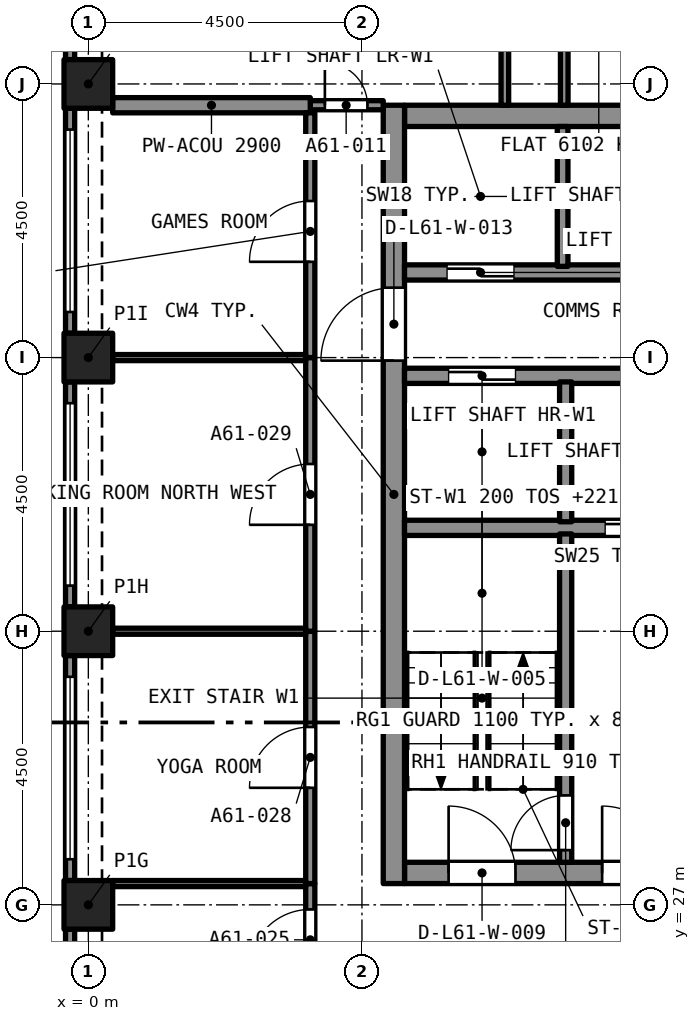
"""IFC4 building model, lengths in metres.
Left out: names, types, materials, properties, quantities, classifications, styles, units other than length and angle.
Written with IfcOpenShell. Run it as: python <this file> out.ifc"""

import sys

from ifc_helpers import new_model, si_unit, direction, frame, frame_2d, origin, origin_2d, place, context, subcontext, project, spatial, rectangle, extrude, element, fill, save


model = new_model("IFC4")
c1 = context("Model", 3, precision=1e-05, world=origin(), true_north=direction((0.0, 1.0)))
c2 = subcontext(c1, "Body", "Model", "MODEL_VIEW")
j1 = project(units=[si_unit("LENGTHUNIT", "METRE"), si_unit("PLANEANGLEUNIT", "RADIAN")], contexts=[c1])
p1 = place(None, origin())
s1 = spatial("IfcSite", under=j1, at=p1, CompositionType="ELEMENT")
p2 = place(p1, origin())
s2 = spatial("IfcBuilding", under=s1, at=p2, CompositionType="ELEMENT")
p3 = place(p2, frame((0.0, 0.0, 219.695)))
s3 = spatial("IfcBuildingStorey", under=s2, at=p3, CompositionType="ELEMENT", Elevation=219.695)
for number, where, z_axis, x_axis in (
    (1, (0.0, 27.0, 0.0), (0.0, 0.0, 1.0), (1.0, 0.0, 0.0)),
    (2, (0.0, 31.5, 0.0), (0.0, 0.0, 1.0), (1.0, 0.0, 0.0)),
    (3, (0.0, 36.0, 0.0), (0.0, 0.0, 1.0), (1.0, 0.0, 0.0)),
    (4, (0.0, 40.5, 0.0), (0.0, 0.0, 1.0), (1.0, 0.0, 0.0)),
):
    element("IfcColumn", number, at=place(p3, frame(where, z_axis=z_axis, x_axis=x_axis)), inside=s3, PredefinedType="COLUMN", context=c2, shape_type="SweptSolid", body=[
        extrude(rectangle(XDim=0.8, YDim=0.8, at=origin_2d()), origin(), (0.0, 0.0, 1.0), 3.2),
    ])
p4 = place(p3, frame((5.2, 27.525, 0.0), z_axis=(0.0, 0.0, 1.0), x_axis=(1.0, 0.0, 0.0)))
e5 = element("IfcWall", 5, at=p4, inside=s3, PredefinedType="SOLIDWALL", context=c2, shape_type="SweptSolid", body=[
    extrude(rectangle(XDim=7.6, YDim=0.35, at=frame_2d((3.8, 0.0))), origin(), (0.0, 0.0, 1.0), 3.2),
])
p5 = place(p4, frame((0.725, 0.0, 0.0)))
e6 = element("IfcOpeningElement", 6, at=p5, cuts=e5, PredefinedType="OPENING", context=c2, shape_type="SweptSolid", body=[
    extrude(rectangle(XDim=1.1, YDim=2.1, at=frame_2d((0.55, 1.05))), frame((0.0, 0.185, 0.0), z_axis=(0.0, -1.0, 0.0), x_axis=(1.0, 0.0, 0.0)), (0.0, 0.0, 1.0), 0.37),
])
p6 = place(p4, frame((3.25, 0.0, 0.0)))
e7 = element("IfcOpeningElement", 7, at=p6, cuts=e5, PredefinedType="OPENING", context=c2, shape_type="SweptSolid", body=[
    extrude(rectangle(XDim=1.1, YDim=2.1, at=frame_2d((0.55, 1.05))), frame((0.0, 0.185, 0.0), z_axis=(0.0, -1.0, 0.0), x_axis=(1.0, 0.0, 0.0)), (0.0, 0.0, 1.0), 0.37),
])
p7 = place(p4, frame((5.775, 0.0, 0.0)))
e8 = element("IfcOpeningElement", 8, at=p7, cuts=e5, PredefinedType="OPENING", context=c2, shape_type="SweptSolid", body=[
    extrude(rectangle(XDim=1.1, YDim=2.1, at=frame_2d((0.55, 1.05))), frame((0.0, 0.185, 0.0), z_axis=(0.0, -1.0, 0.0), x_axis=(1.0, 0.0, 0.0)), (0.0, 0.0, 1.0), 0.37),
])
p8 = place(p3, frame((5.2, 39.975, 0.0), z_axis=(0.0, 0.0, 1.0), x_axis=(1.0, 0.0, 0.0)))
e9 = element("IfcWall", 9, at=p8, inside=s3, PredefinedType="SOLIDWALL", context=c2, shape_type="SweptSolid", body=[
    extrude(rectangle(XDim=7.6, YDim=0.35, at=frame_2d((3.8, 0.0))), origin(), (0.0, 0.0, 1.0), 3.2),
])
p9 = place(p3, frame((5.025, 27.35, 0.0), z_axis=(0.0, 0.0, 1.0), x_axis=(0.0, 1.0, 0.0)))
e10 = element("IfcWall", 10, at=p9, inside=s3, PredefinedType="SOLIDWALL", context=c2, shape_type="SweptSolid", body=[
    extrude(rectangle(XDim=12.8, YDim=0.35, at=frame_2d((6.4, 0.0))), origin(), (0.0, 0.0, 1.0), 3.2),
])
p10 = place(p9, frame((8.6, 0.0, 0.0)))
e11 = element("IfcOpeningElement", 11, at=p10, cuts=e10, PredefinedType="OPENING", context=c2, shape_type="SweptSolid", body=[
    extrude(rectangle(XDim=1.2, YDim=2.1, at=frame_2d((0.6, 1.05))), frame((0.0, 0.185, 0.0), z_axis=(0.0, -1.0, 0.0), x_axis=(1.0, 0.0, 0.0)), (0.0, 0.0, 1.0), 0.37),
])
p11 = place(p3, frame((-0.3, 40.9, 0.0), z_axis=(0.0, 0.0, 1.0), x_axis=(0.0, 1.0, 0.0)))
e12 = element("IfcWall", 12, at=p11, inside=s3, PredefinedType="SOLIDWALL", context=c2, shape_type="SweptSolid", body=[
    extrude(rectangle(XDim=3.7, YDim=0.15, at=frame_2d((1.85, 0.0))), origin(), (0.0, 0.0, 1.0), 3.2),
])
p12 = place(p11, frame((0.35, 0.0, 0.45)))
e13 = element("IfcOpeningElement", 13, at=p12, cuts=e12, PredefinedType="OPENING", context=c2, shape_type="SweptSolid", body=[
    extrude(rectangle(XDim=3.0, YDim=1.95, at=frame_2d((1.5, 0.975))), frame((0.0, 0.085, 0.0), z_axis=(0.0, -1.0, 0.0), x_axis=(1.0, 0.0, 0.0)), (0.0, 0.0, 1.0), 0.17),
])
p13 = place(p3, frame((-0.3, 36.4, 0.0), z_axis=(0.0, 0.0, 1.0), x_axis=(0.0, 1.0, 0.0)))
e14 = element("IfcWall", 14, at=p13, inside=s3, PredefinedType="SOLIDWALL", context=c2, shape_type="SweptSolid", body=[
    extrude(rectangle(XDim=3.7, YDim=0.15, at=frame_2d((1.85, 0.0))), origin(), (0.0, 0.0, 1.0), 3.2),
])
p14 = place(p13, frame((0.35, 0.0, 0.45)))
e15 = element("IfcOpeningElement", 15, at=p14, cuts=e14, PredefinedType="OPENING", context=c2, shape_type="SweptSolid", body=[
    extrude(rectangle(XDim=3.0, YDim=1.95, at=frame_2d((1.5, 0.975))), frame((0.0, 0.085, 0.0), z_axis=(0.0, -1.0, 0.0), x_axis=(1.0, 0.0, 0.0)), (0.0, 0.0, 1.0), 0.17),
])
p15 = place(p3, frame((-0.3, 31.9, 0.0), z_axis=(0.0, 0.0, 1.0), x_axis=(0.0, 1.0, 0.0)))
e16 = element("IfcWall", 16, at=p15, inside=s3, PredefinedType="SOLIDWALL", context=c2, shape_type="SweptSolid", body=[
    extrude(rectangle(XDim=3.7, YDim=0.15, at=frame_2d((1.85, 0.0))), origin(), (0.0, 0.0, 1.0), 3.2),
])
p16 = place(p15, frame((0.35, 0.0, 0.45)))
e17 = element("IfcOpeningElement", 17, at=p16, cuts=e16, PredefinedType="OPENING", context=c2, shape_type="SweptSolid", body=[
    extrude(rectangle(XDim=3.0, YDim=1.95, at=frame_2d((1.5, 0.975))), frame((0.0, 0.085, 0.0), z_axis=(0.0, -1.0, 0.0), x_axis=(1.0, 0.0, 0.0)), (0.0, 0.0, 1.0), 0.17),
])
p17 = place(p3, frame((-0.3, 27.4, 0.0), z_axis=(0.0, 0.0, 1.0), x_axis=(0.0, 1.0, 0.0)))
e18 = element("IfcWall", 18, at=p17, inside=s3, PredefinedType="SOLIDWALL", context=c2, shape_type="SweptSolid", body=[
    extrude(rectangle(XDim=3.7, YDim=0.15, at=frame_2d((1.85, 0.0))), origin(), (0.0, 0.0, 1.0), 3.2),
])
p18 = place(p17, frame((0.35, 0.0, 0.45)))
e19 = element("IfcOpeningElement", 19, at=p18, cuts=e18, PredefinedType="OPENING", context=c2, shape_type="SweptSolid", body=[
    extrude(rectangle(XDim=3.0, YDim=1.95, at=frame_2d((1.5, 0.975))), frame((0.0, 0.085, 0.0), z_axis=(0.0, -1.0, 0.0), x_axis=(1.0, 0.0, 0.0)), (0.0, 0.0, 1.0), 0.17),
])
p19 = place(p3, frame((-0.3, 22.9, 0.0), z_axis=(0.0, 0.0, 1.0), x_axis=(0.0, 1.0, 0.0)))
e20 = element("IfcWall", 20, at=p19, inside=s3, PredefinedType="SOLIDWALL", context=c2, shape_type="SweptSolid", body=[
    extrude(rectangle(XDim=3.7, YDim=0.15, at=frame_2d((1.85, 0.0))), origin(), (0.0, 0.0, 1.0), 3.2),
])
p20 = place(p19, frame((0.35, 0.0, 0.45)))
e21 = element("IfcOpeningElement", 21, at=p20, cuts=e20, PredefinedType="OPENING", context=c2, shape_type="SweptSolid", body=[
    extrude(rectangle(XDim=3.0, YDim=1.95, at=frame_2d((1.5, 0.975))), frame((0.0, 0.085, 0.0), z_axis=(0.0, -1.0, 0.0), x_axis=(1.0, 0.0, 0.0)), (0.0, 0.0, 1.0), 0.17),
])
p21 = place(p3, frame((6.85, 43.683, 0.0), z_axis=(0.0, 0.0, 1.0), x_axis=(0.0, -1.0, 0.0)))
e22 = element("IfcWall", 22, at=p21, inside=s3, PredefinedType="PARTITIONING", context=c2, shape_type="SweptSolid", body=[
    extrude(rectangle(XDim=3.533, YDim=0.125, at=frame_2d((1.766, 0.0))), origin(), (0.0, 0.0, 1.0), 2.9),
])
p22 = place(p21, frame((0.183, 0.0, 0.0)))
e23 = element("IfcOpeningElement", 23, at=p22, cuts=e22, PredefinedType="OPENING", context=c2, shape_type="SweptSolid", body=[
    extrude(rectangle(XDim=0.8, YDim=2.1, at=frame_2d((0.4, 1.05))), frame((0.0, 0.073, 0.0), z_axis=(0.0, -1.0, 0.0), x_axis=(1.0, 0.0, 0.0)), (0.0, 0.0, 1.0), 0.145),
])
p23 = place(p3, frame((7.827, 40.15, 0.0), z_axis=(0.0, 0.0, 1.0), x_axis=(0.0, 1.0, 0.0)))
e24 = element("IfcWall", 24, at=p23, inside=s3, PredefinedType="PARTITIONING", context=c2, shape_type="SweptSolid", body=[
    extrude(rectangle(XDim=3.408, YDim=0.125, at=frame_2d((1.704, 0.0))), origin(), (0.0, 0.0, 1.0), 2.9),
])
p24 = place(p3, frame((3.65, 40.15, 0.0), z_axis=(0.0, 0.0, 1.0), x_axis=(1.0, 0.0, 0.0)))
e25 = element("IfcWall", 25, at=p24, inside=s3, PredefinedType="PARTITIONING", context=c2, shape_type="SweptSolid", body=[
    extrude(rectangle(XDim=1.2, YDim=0.15, at=frame_2d((0.6, 0.0))), origin(), (0.0, 0.0, 1.0), 2.9),
])
p25 = place(p24, frame((0.24, 0.0, 0.0)))
e26 = element("IfcOpeningElement", 26, at=p25, cuts=e25, PredefinedType="OPENING", context=c2, shape_type="SweptSolid", body=[
    extrude(rectangle(XDim=0.7, YDim=2.1, at=frame_2d((0.35, 1.05))), frame((0.0, 0.085, 0.0), z_axis=(0.0, -1.0, 0.0), x_axis=(1.0, 0.0, 0.0)), (0.0, 0.0, 1.0), 0.17),
])
p26 = place(p3, frame((0.4, 40.15, 0.0), z_axis=(0.0, 0.0, 1.0), x_axis=(1.0, 0.0, 0.0)))
e27 = element("IfcWall", 27, at=p26, inside=s3, PredefinedType="PARTITIONING", context=c2, shape_type="SweptSolid", body=[
    extrude(rectangle(XDim=3.25, YDim=0.25, at=frame_2d((1.625, 0.0))), origin(), (0.0, 0.0, 1.0), 2.9),
])
p27 = place(p3, frame((3.65, 25.425, 0.0), z_axis=(0.0, 0.0, 1.0), x_axis=(0.0, 1.0, 0.0)))
e28 = element("IfcWall", 28, at=p27, inside=s3, PredefinedType="PARTITIONING", context=c2, shape_type="SweptSolid", body=[
    extrude(rectangle(XDim=1.925, YDim=0.15, at=frame_2d((0.962, 0.0))), origin(), (0.0, 0.0, 1.0), 2.9),
])
p28 = place(p27, frame((0.5, 0.0, 0.0)))
e29 = element("IfcOpeningElement", 29, at=p28, cuts=e28, PredefinedType="OPENING", context=c2, shape_type="SweptSolid", body=[
    extrude(rectangle(XDim=1.0, YDim=2.1, at=frame_2d((0.5, 1.05))), frame((0.0, 0.085, 0.0), z_axis=(0.0, -1.0, 0.0), x_axis=(1.0, 0.0, 0.0)), (0.0, 0.0, 1.0), 0.17),
])
p29 = place(p3, frame((3.65, 27.35, 0.0), z_axis=(0.0, 0.0, 1.0), x_axis=(0.0, 1.0, 0.0)))
e30 = element("IfcWall", 30, at=p29, inside=s3, PredefinedType="PARTITIONING", context=c2, shape_type="SweptSolid", body=[
    extrude(rectangle(XDim=4.15, YDim=0.15, at=frame_2d((2.075, 0.0))), origin(), (0.0, 0.0, 1.0), 2.9),
])
p30 = place(p29, frame((1.575, 0.0, 0.0)))
e31 = element("IfcOpeningElement", 31, at=p30, cuts=e30, PredefinedType="OPENING", context=c2, shape_type="SweptSolid", body=[
    extrude(rectangle(XDim=1.0, YDim=2.1, at=frame_2d((0.5, 1.05))), frame((0.0, 0.085, 0.0), z_axis=(0.0, -1.0, 0.0), x_axis=(1.0, 0.0, 0.0)), (0.0, 0.0, 1.0), 0.17),
])
p31 = place(p3, frame((3.65, 31.5, 0.0), z_axis=(0.0, 0.0, 1.0), x_axis=(0.0, 1.0, 0.0)))
e32 = element("IfcWall", 32, at=p31, inside=s3, PredefinedType="PARTITIONING", context=c2, shape_type="SweptSolid", body=[
    extrude(rectangle(XDim=4.5, YDim=0.15, at=frame_2d((2.25, 0.0))), origin(), (0.0, 0.0, 1.0), 2.9),
])
p32 = place(p31, frame((1.75, 0.0, 0.0)))
e33 = element("IfcOpeningElement", 33, at=p32, cuts=e32, PredefinedType="OPENING", context=c2, shape_type="SweptSolid", body=[
    extrude(rectangle(XDim=1.0, YDim=2.1, at=frame_2d((0.5, 1.05))), frame((0.0, 0.085, 0.0), z_axis=(0.0, -1.0, 0.0), x_axis=(1.0, 0.0, 0.0)), (0.0, 0.0, 1.0), 0.17),
])
p33 = place(p3, frame((3.65, 36.0, 0.0), z_axis=(0.0, 0.0, 1.0), x_axis=(0.0, 1.0, 0.0)))
e34 = element("IfcWall", 34, at=p33, inside=s3, PredefinedType="PARTITIONING", context=c2, shape_type="SweptSolid", body=[
    extrude(rectangle(XDim=4.025, YDim=0.15, at=frame_2d((2.012, 0.0))), origin(), (0.0, 0.0, 1.0), 2.9),
])
p34 = place(p33, frame((1.575, 0.0, 0.0)))
e35 = element("IfcOpeningElement", 35, at=p34, cuts=e34, PredefinedType="OPENING", context=c2, shape_type="SweptSolid", body=[
    extrude(rectangle(XDim=1.0, YDim=2.1, at=frame_2d((0.5, 1.05))), frame((0.0, 0.085, 0.0), z_axis=(0.0, -1.0, 0.0), x_axis=(1.0, 0.0, 0.0)), (0.0, 0.0, 1.0), 0.17),
])
for number, where, z_axis, x_axis in (
    (36, (0.4, 27.35, 0.0), (0.0, 0.0, 1.0), (1.0, 0.0, 0.0)),
    (37, (0.4, 31.5, 0.0), (0.0, 0.0, 1.0), (1.0, 0.0, 0.0)),
    (38, (0.4, 36.0, 0.0), (0.0, 0.0, 1.0), (1.0, 0.0, 0.0)),
):
    element("IfcWall", number, at=place(p3, frame(where, z_axis=z_axis, x_axis=x_axis)), inside=s3, PredefinedType="PARTITIONING", context=c2, shape_type="SweptSolid", body=[
        extrude(rectangle(XDim=3.175, YDim=0.1, at=frame_2d((1.587, 0.0))), origin(), (0.0, 0.0, 1.0), 2.9),
    ])
p35 = place(p3, frame((5.2, 33.2, 0.0), z_axis=(0.0, 0.0, 1.0), x_axis=(1.0, 0.0, 0.0)))
e39 = element("IfcWall", 39, at=p35, inside=s3, PredefinedType="SOLIDWALL", context=c2, shape_type="SweptSolid", body=[
    extrude(rectangle(XDim=7.6, YDim=0.25, at=frame_2d((3.8, 0.0))), origin(), (0.0, 0.0, 1.0), 2.9),
])
p36 = place(p35, frame((3.3, 0.0, 0.0)))
e40 = element("IfcOpeningElement", 40, at=p36, cuts=e39, PredefinedType="OPENING", context=c2, shape_type="SweptSolid", body=[
    extrude(rectangle(XDim=1.0, YDim=2.1, at=frame_2d((0.5, 1.05))), frame((0.0, 0.135, 0.0), z_axis=(0.0, -1.0, 0.0), x_axis=(1.0, 0.0, 0.0)), (0.0, 0.0, 1.0), 0.27),
])
p37 = place(p3, frame((5.2, 35.7, 0.0), z_axis=(0.0, 0.0, 1.0), x_axis=(1.0, 0.0, 0.0)))
e41 = element("IfcWall", 41, at=p37, inside=s3, PredefinedType="SOLIDWALL", context=c2, shape_type="SweptSolid", body=[
    extrude(rectangle(XDim=7.6, YDim=0.25, at=frame_2d((3.8, 0.0))), origin(), (0.0, 0.0, 1.0), 2.9),
])
p38 = place(p37, frame((0.725, 0.0, 0.0)))
e42 = element("IfcOpeningElement", 42, at=p38, cuts=e41, PredefinedType="OPENING", context=c2, shape_type="SweptSolid", body=[
    extrude(rectangle(XDim=1.1, YDim=2.4, at=frame_2d((0.55, 1.2))), frame((0.0, 0.135, 0.0), z_axis=(0.0, -1.0, 0.0), x_axis=(1.0, 0.0, 0.0)), (0.0, 0.0, 1.0), 0.27),
])
p39 = place(p37, frame((5.125, 0.0, 0.0)))
e43 = element("IfcOpeningElement", 43, at=p39, cuts=e41, PredefinedType="OPENING", context=c2, shape_type="SweptSolid", body=[
    extrude(rectangle(XDim=0.8, YDim=2.1, at=frame_2d((0.4, 1.05))), frame((0.0, 0.135, 0.0), z_axis=(0.0, -1.0, 0.0), x_axis=(1.0, 0.0, 0.0)), (0.0, 0.0, 1.0), 0.27),
])
p40 = place(p37, frame((6.45, 0.0, 0.0)))
e44 = element("IfcOpeningElement", 44, at=p40, cuts=e41, PredefinedType="OPENING", context=c2, shape_type="SweptSolid", body=[
    extrude(rectangle(XDim=0.9, YDim=2.1, at=frame_2d((0.45, 1.05))), frame((0.0, 0.135, 0.0), z_axis=(0.0, -1.0, 0.0), x_axis=(1.0, 0.0, 0.0)), (0.0, 0.0, 1.0), 0.27),
])
p41 = place(p3, frame((5.2, 37.4, 0.0), z_axis=(0.0, 0.0, 1.0), x_axis=(1.0, 0.0, 0.0)))
e45 = element("IfcWall", 45, at=p41, inside=s3, PredefinedType="SOLIDWALL", context=c2, shape_type="SweptSolid", body=[
    extrude(rectangle(XDim=7.6, YDim=0.25, at=frame_2d((3.8, 0.0))), origin(), (0.0, 0.0, 1.0), 2.9),
])
p42 = place(p41, frame((0.7, 0.0, 0.0)))
e46 = element("IfcOpeningElement", 46, at=p42, cuts=e45, PredefinedType="OPENING", context=c2, shape_type="SweptSolid", body=[
    extrude(rectangle(XDim=1.1, YDim=2.4, at=frame_2d((0.55, 1.2))), frame((0.0, 0.135, 0.0), z_axis=(0.0, -1.0, 0.0), x_axis=(1.0, 0.0, 0.0)), (0.0, 0.0, 1.0), 0.27),
])
p43 = place(p3, frame((7.85, 27.7, 0.0), z_axis=(0.0, 0.0, 1.0), x_axis=(0.0, 1.0, 0.0)))
e47 = element("IfcWall", 47, at=p43, inside=s3, PredefinedType="SOLIDWALL", context=c2, shape_type="SweptSolid", body=[
    extrude(rectangle(XDim=5.4, YDim=0.2, at=frame_2d((2.7, 0.0))), origin(), (0.0, 0.0, 1.0), 2.9),
])
p44 = place(p43, frame((0.2, 0.0, 0.0)))
e48 = element("IfcOpeningElement", 48, at=p44, cuts=e47, PredefinedType="OPENING", context=c2, shape_type="SweptSolid", body=[
    extrude(rectangle(XDim=0.9, YDim=2.1, at=frame_2d((0.45, 1.05))), frame((0.0, 0.11, 0.0), z_axis=(0.0, -1.0, 0.0), x_axis=(1.0, 0.0, 0.0)), (0.0, 0.0, 1.0), 0.22),
])
p45 = place(p3, frame((7.85, 33.3, 0.0), z_axis=(0.0, 0.0, 1.0), x_axis=(0.0, 1.0, 0.0)))
e49 = element("IfcWall", 49, at=p45, inside=s3, PredefinedType="SOLIDWALL", context=c2, shape_type="SweptSolid", body=[
    extrude(rectangle(XDim=2.3, YDim=0.2, at=frame_2d((1.15, 0.0))), origin(), (0.0, 0.0, 1.0), 2.9),
])
p46 = place(p3, frame((7.8, 37.5, 0.0), z_axis=(0.0, 0.0, 1.0), x_axis=(0.0, 1.0, 0.0)))
e50 = element("IfcWall", 50, at=p46, inside=s3, PredefinedType="SOLIDWALL", context=c2, shape_type="SweptSolid", body=[
    extrude(rectangle(XDim=2.3, YDim=0.175, at=frame_2d((1.15, 0.0))), origin(), (0.0, 0.0, 1.0), 2.9),
])
p47 = place(p14, origin())
e51 = element("IfcWindow", 51, at=p47, inside=s3, PartitioningType="SINGLE_PANEL", PredefinedType="WINDOW", context=c2, shape_type="SweptSolid", body=[
    extrude(rectangle(XDim=3.0, YDim=1.95, at=frame_2d((1.5, 0.975))), frame((0.0, 0.03, 0.0), z_axis=(0.0, -1.0, 0.0), x_axis=(1.0, 0.0, 0.0)), (0.0, 0.0, 1.0), 0.06),
])
fill(e15, e51)
p48 = place(p16, origin())
e52 = element("IfcWindow", 52, at=p48, inside=s3, PartitioningType="SINGLE_PANEL", PredefinedType="WINDOW", context=c2, shape_type="SweptSolid", body=[
    extrude(rectangle(XDim=3.0, YDim=1.95, at=frame_2d((1.5, 0.975))), frame((0.0, 0.03, 0.0), z_axis=(0.0, -1.0, 0.0), x_axis=(1.0, 0.0, 0.0)), (0.0, 0.0, 1.0), 0.06),
])
fill(e17, e52)
p49 = place(p18, origin())
e53 = element("IfcWindow", 53, at=p49, inside=s3, PartitioningType="SINGLE_PANEL", PredefinedType="WINDOW", context=c2, shape_type="SweptSolid", body=[
    extrude(rectangle(XDim=3.0, YDim=1.95, at=frame_2d((1.5, 0.975))), frame((0.0, 0.03, 0.0), z_axis=(0.0, -1.0, 0.0), x_axis=(1.0, 0.0, 0.0)), (0.0, 0.0, 1.0), 0.06),
])
fill(e19, e53)
p50 = place(p25, origin())
e54 = element("IfcDoor", 54, at=p50, inside=s3, OperationType="SINGLE_SWING_LEFT", PredefinedType="DOOR", context=c2, shape_type="SweptSolid", body=[
    extrude(rectangle(XDim=0.7, YDim=2.1, at=frame_2d((0.35, 1.05))), frame((0.0, 0.025, 0.0), z_axis=(0.0, -1.0, 0.0), x_axis=(1.0, 0.0, 0.0)), (0.0, 0.0, 1.0), 0.05),
])
fill(e26, e54)
p51 = place(p28, origin())
e55 = element("IfcDoor", 55, at=p51, inside=s3, OperationType="SINGLE_SWING_RIGHT", PredefinedType="DOOR", context=c2, shape_type="SweptSolid", body=[
    extrude(rectangle(XDim=1.0, YDim=2.1, at=frame_2d((0.5, 1.05))), frame((0.0, 0.025, 0.0), z_axis=(0.0, -1.0, 0.0), x_axis=(1.0, 0.0, 0.0)), (0.0, 0.0, 1.0), 0.05),
])
fill(e29, e55)
p52 = place(p30, origin())
e56 = element("IfcDoor", 56, at=p52, inside=s3, OperationType="SINGLE_SWING_RIGHT", PredefinedType="DOOR", context=c2, shape_type="SweptSolid", body=[
    extrude(rectangle(XDim=1.0, YDim=2.1, at=frame_2d((0.5, 1.05))), frame((0.0, 0.025, 0.0), z_axis=(0.0, -1.0, 0.0), x_axis=(1.0, 0.0, 0.0)), (0.0, 0.0, 1.0), 0.05),
])
fill(e31, e56)
p53 = place(p32, origin())
e57 = element("IfcDoor", 57, at=p53, inside=s3, OperationType="SINGLE_SWING_RIGHT", PredefinedType="DOOR", context=c2, shape_type="SweptSolid", body=[
    extrude(rectangle(XDim=1.0, YDim=2.1, at=frame_2d((0.5, 1.05))), frame((0.0, 0.025, 0.0), z_axis=(0.0, -1.0, 0.0), x_axis=(1.0, 0.0, 0.0)), (0.0, 0.0, 1.0), 0.05),
])
fill(e33, e57)
p54 = place(p34, origin())
e58 = element("IfcDoor", 58, at=p54, inside=s3, OperationType="SINGLE_SWING_RIGHT", PredefinedType="DOOR", context=c2, shape_type="SweptSolid", body=[
    extrude(rectangle(XDim=1.0, YDim=2.1, at=frame_2d((0.5, 1.05))), frame((0.0, 0.025, 0.0), z_axis=(0.0, -1.0, 0.0), x_axis=(1.0, 0.0, 0.0)), (0.0, 0.0, 1.0), 0.05),
])
fill(e35, e58)
p55 = place(p44, origin())
e59 = element("IfcDoor", 59, at=p55, inside=s3, OperationType="SINGLE_SWING_LEFT", PredefinedType="DOOR", context=c2, shape_type="SweptSolid", body=[
    extrude(rectangle(XDim=0.9, YDim=2.1, at=frame_2d((0.45, 1.05))), frame((0.0, 0.025, 0.0), z_axis=(0.0, -1.0, 0.0), x_axis=(1.0, 0.0, 0.0)), (0.0, 0.0, 1.0), 0.05),
])
fill(e48, e59)
p56 = place(p42, origin())
e60 = element("IfcDoor", 60, at=p56, inside=s3, OperationType="SLIDING_TO_LEFT", PredefinedType="DOOR", context=c2, shape_type="SweptSolid", body=[
    extrude(rectangle(XDim=1.1, YDim=2.4, at=frame_2d((0.55, 1.2))), frame((0.0, 0.025, 0.0), z_axis=(0.0, -1.0, 0.0), x_axis=(1.0, 0.0, 0.0)), (0.0, 0.0, 1.0), 0.05),
])
fill(e46, e60)
p57 = place(p38, origin())
e61 = element("IfcDoor", 61, at=p57, inside=s3, OperationType="SLIDING_TO_LEFT", PredefinedType="DOOR", context=c2, shape_type="SweptSolid", body=[
    extrude(rectangle(XDim=1.1, YDim=2.4, at=frame_2d((0.55, 1.2))), frame((0.0, 0.025, 0.0), z_axis=(0.0, -1.0, 0.0), x_axis=(1.0, 0.0, 0.0)), (0.0, 0.0, 1.0), 0.05),
])
fill(e42, e61)
p58 = place(p36, origin())
e62 = element("IfcDoor", 62, at=p58, inside=s3, OperationType="SLIDING_TO_LEFT", PredefinedType="DOOR", context=c2, shape_type="SweptSolid", body=[
    extrude(rectangle(XDim=1.0, YDim=2.1, at=frame_2d((0.5, 1.05))), frame((0.0, 0.025, 0.0), z_axis=(0.0, -1.0, 0.0), x_axis=(1.0, 0.0, 0.0)), (0.0, 0.0, 1.0), 0.05),
])
fill(e40, e62)
p59 = place(p5, origin())
e63 = element("IfcDoor", 63, at=p59, inside=s3, OperationType="SINGLE_SWING_LEFT", PredefinedType="DOOR", context=c2, shape_type="SweptSolid", body=[
    extrude(rectangle(XDim=1.1, YDim=2.1, at=frame_2d((0.55, 1.05))), frame((0.0, 0.025, 0.0), z_axis=(0.0, -1.0, 0.0), x_axis=(1.0, 0.0, 0.0)), (0.0, 0.0, 1.0), 0.05),
])
fill(e6, e63)
p60 = place(p6, origin())
e64 = element("IfcDoor", 64, at=p60, inside=s3, OperationType="SINGLE_SWING_LEFT", PredefinedType="DOOR", context=c2, shape_type="SweptSolid", body=[
    extrude(rectangle(XDim=1.1, YDim=2.1, at=frame_2d((0.55, 1.05))), frame((0.0, 0.025, 0.0), z_axis=(0.0, -1.0, 0.0), x_axis=(1.0, 0.0, 0.0)), (0.0, 0.0, 1.0), 0.05),
])
fill(e7, e64)
p61 = place(p10, origin())
e65 = element("IfcDoor", 65, at=p61, inside=s3, OperationType="SINGLE_SWING_LEFT", PredefinedType="DOOR", context=c2, shape_type="SweptSolid", body=[
    extrude(rectangle(XDim=1.2, YDim=2.1, at=frame_2d((0.6, 1.05))), frame((0.0, 0.025, 0.0), z_axis=(0.0, -1.0, 0.0), x_axis=(1.0, 0.0, 0.0)), (0.0, 0.0, 1.0), 0.05),
])
fill(e11, e65)
save(model, sys.argv[1])
